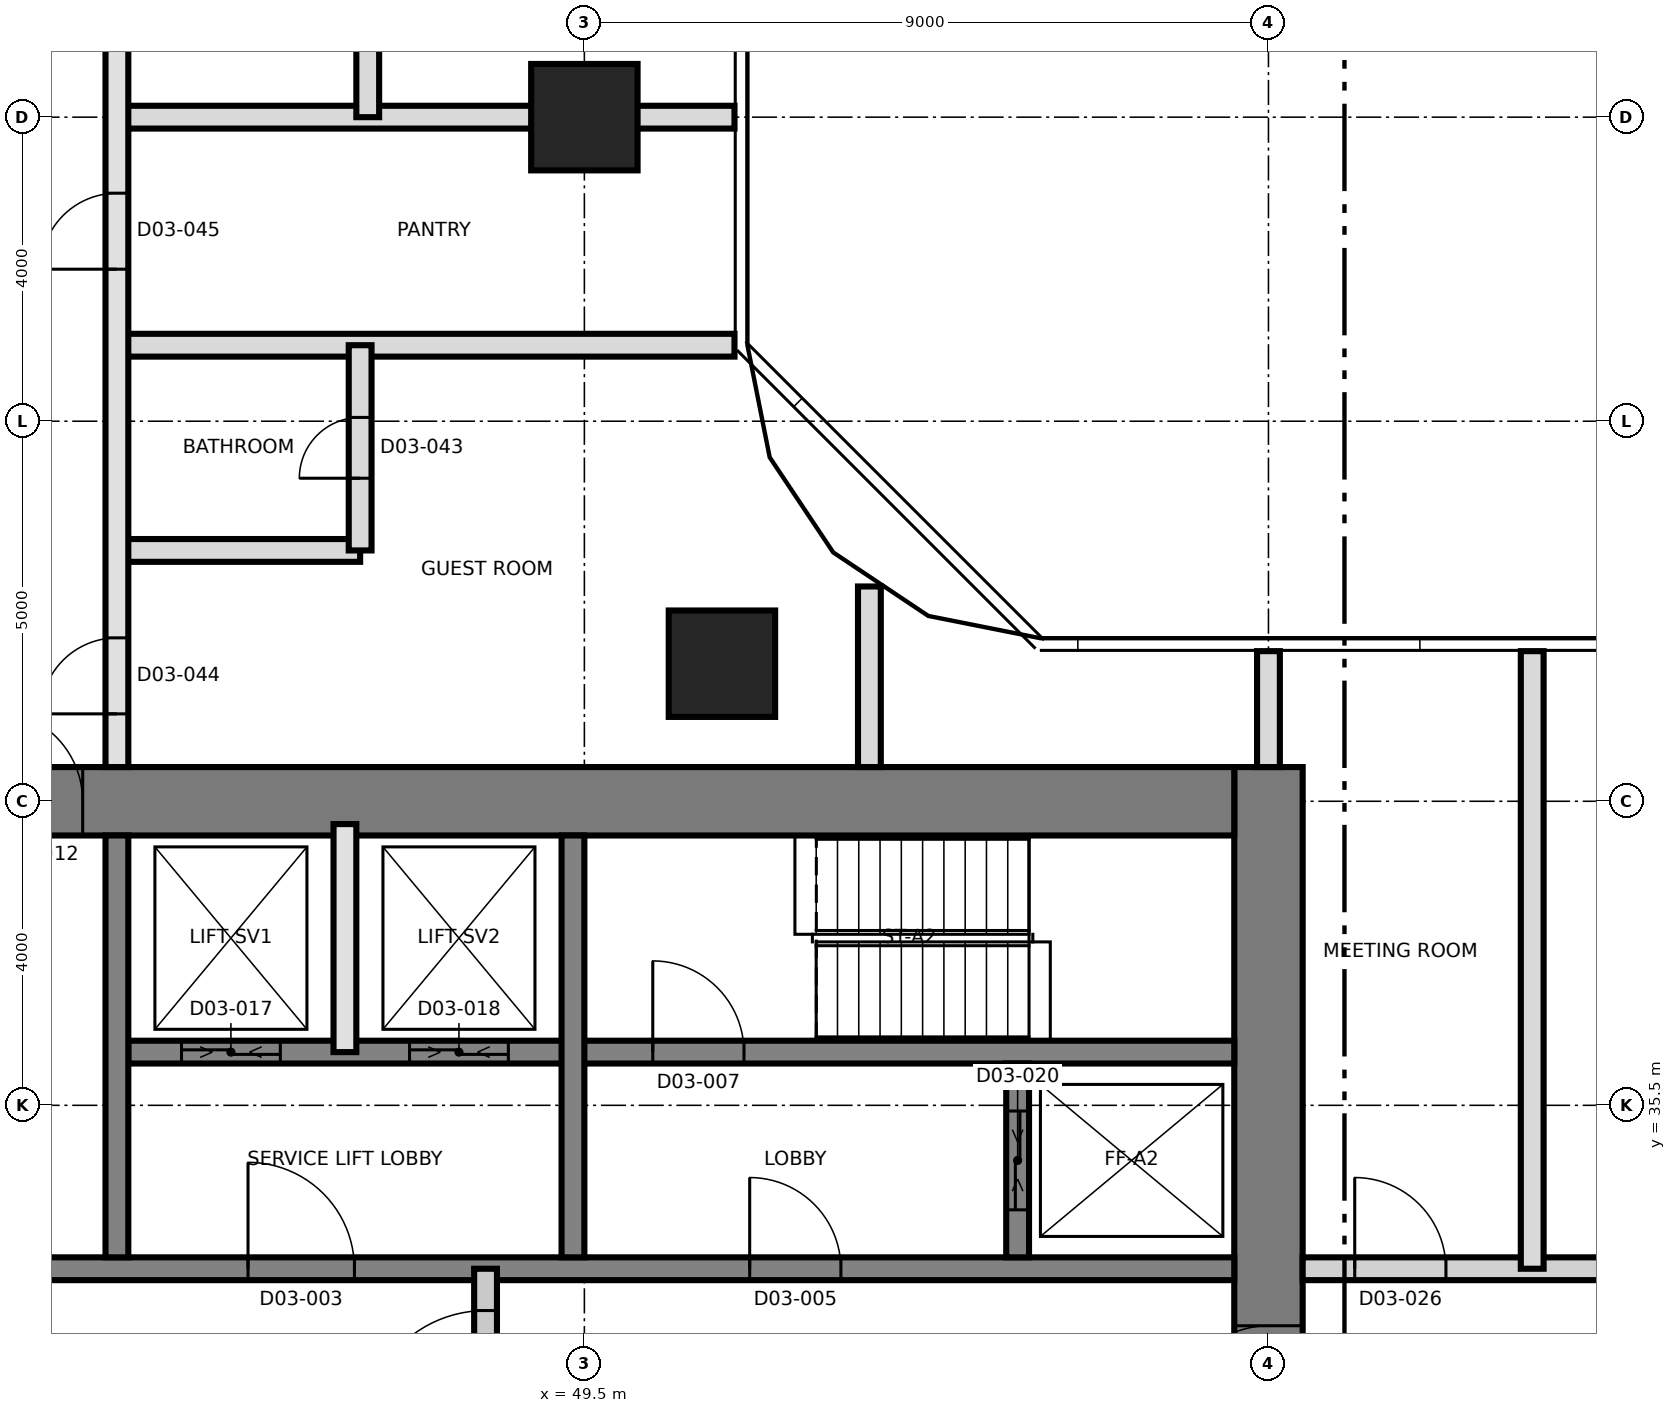
"""IFC4 building model, lengths in metres.
Left out: names, types, materials, properties, quantities, classifications, styles, units other than length and angle.
Written with IfcOpenShell. Run it as: python <this file> out.ifc"""

import sys

from ifc_helpers import new_model, si_unit, direction, frame, frame_2d, origin, origin_2d, place, context, subcontext, project, spatial, rectangle, extrude, element, fill, save


model = new_model("IFC4")
c1 = context("Model", 3, precision=1e-05, world=origin(), true_north=direction((0.0, 1.0)))
c2 = subcontext(c1, "Body", "Model", "MODEL_VIEW")
j1 = project(units=[si_unit("LENGTHUNIT", "METRE"), si_unit("PLANEANGLEUNIT", "RADIAN")], contexts=[c1])
p1 = place(None, origin())
s1 = spatial("IfcSite", under=j1, at=p1, CompositionType="ELEMENT")
p2 = place(p1, origin())
s2 = spatial("IfcBuilding", under=s1, at=p2, CompositionType="ELEMENT")
p3 = place(p2, frame((0.0, 0.0, 59.4)))
s3 = spatial("IfcBuildingStorey", under=s2, at=p3, CompositionType="ELEMENT", Elevation=59.4)
p4 = place(p3, frame((58.5, 21.05, 0.0), z_axis=(0.0, 0.0, 1.0), x_axis=(0.0, 1.0, 0.0)))
e1 = element("IfcWall", 1, at=p4, inside=s3, PredefinedType="SHEAR", context=c2, shape_type="SweptSolid", body=[
    extrude(rectangle(XDim=18.9, YDim=0.9, at=frame_2d((9.45, 0.0))), origin(), (0.0, 0.0, 1.0), 3.7),
])
p5 = place(p4, frame((10.35, 0.0, 0.0)))
e2 = element("IfcOpeningElement", 2, at=p5, cuts=e1, PredefinedType="OPENING", context=c2, shape_type="SweptSolid", body=[
    extrude(rectangle(XDim=1.2, YDim=2.1, at=frame_2d((0.6, 1.05))), frame((0.0, 0.46, 0.0), z_axis=(0.0, -1.0, 0.0), x_axis=(1.0, 0.0, 0.0)), (0.0, 0.0, 1.0), 0.92),
])
p6 = place(p3, frame((31.05, 39.5, 0.0), z_axis=(0.0, 0.0, 1.0), x_axis=(1.0, 0.0, 0.0)))
e3 = element("IfcWall", 3, at=p6, inside=s3, PredefinedType="SHEAR", context=c2, shape_type="SweptSolid", body=[
    extrude(rectangle(XDim=27.0, YDim=0.9, at=frame_2d((13.5, 0.0))), origin(), (0.0, 0.0, 1.0), 3.7),
])
p7 = place(p6, frame((10.65, 0.0, 0.0)))
e4 = element("IfcOpeningElement", 4, at=p7, cuts=e3, PredefinedType="OPENING", context=c2, shape_type="SweptSolid", body=[
    extrude(rectangle(XDim=1.2, YDim=2.1, at=frame_2d((0.6, 1.05))), frame((0.0, 0.46, 0.0), z_axis=(0.0, -1.0, 0.0), x_axis=(1.0, 0.0, 0.0)), (0.0, 0.0, 1.0), 0.92),
])
p8 = place(p3, frame((31.95, 33.35, 0.0), z_axis=(0.0, 0.0, 1.0), x_axis=(1.0, 0.0, 0.0)))
e5 = element("IfcWall", 5, at=p8, inside=s3, PredefinedType="SHEAR", context=c2, shape_type="SweptSolid", body=[
    extrude(rectangle(XDim=26.1, YDim=0.3, at=frame_2d((13.05, 0.0))), origin(), (0.0, 0.0, 1.0), 3.7),
])
p9 = place(p8, frame((13.125, 0.0, 0.0)))
e6 = element("IfcOpeningElement", 6, at=p9, cuts=e5, PredefinedType="OPENING", context=c2, shape_type="SweptSolid", body=[
    extrude(rectangle(XDim=1.4, YDim=2.1, at=frame_2d((0.7, 1.05))), frame((0.0, 0.16, 0.0), z_axis=(0.0, -1.0, 0.0), x_axis=(1.0, 0.0, 0.0)), (0.0, 0.0, 1.0), 0.32),
])
p10 = place(p8, frame((5.175, 0.0, 0.0)))
e7 = element("IfcOpeningElement", 7, at=p10, cuts=e5, PredefinedType="OPENING", context=c2, shape_type="SweptSolid", body=[
    extrude(rectangle(XDim=1.2, YDim=2.1, at=frame_2d((0.6, 1.05))), frame((0.0, 0.16, 0.0), z_axis=(0.0, -1.0, 0.0), x_axis=(1.0, 0.0, 0.0)), (0.0, 0.0, 1.0), 0.32),
])
p11 = place(p8, frame((19.725, 0.0, 0.0)))
e8 = element("IfcOpeningElement", 8, at=p11, cuts=e5, PredefinedType="OPENING", context=c2, shape_type="SweptSolid", body=[
    extrude(rectangle(XDim=1.2, YDim=2.1, at=frame_2d((0.6, 1.05))), frame((0.0, 0.16, 0.0), z_axis=(0.0, -1.0, 0.0), x_axis=(1.0, 0.0, 0.0)), (0.0, 0.0, 1.0), 0.32),
])
p12 = place(p3, frame((43.5, 36.2, 0.0), z_axis=(0.0, 0.0, 1.0), x_axis=(1.0, 0.0, 0.0)))
e9 = element("IfcWall", 9, at=p12, inside=s3, PredefinedType="SHEAR", context=c2, shape_type="SweptSolid", body=[
    extrude(rectangle(XDim=14.55, YDim=0.3, at=frame_2d((7.275, 0.0))), origin(), (0.0, 0.0, 1.0), 3.7),
])
p13 = place(p12, frame((6.9, 0.0, 0.0)))
e10 = element("IfcOpeningElement", 10, at=p13, cuts=e9, PredefinedType="OPENING", context=c2, shape_type="SweptSolid", body=[
    extrude(rectangle(XDim=1.2, YDim=2.1, at=frame_2d((0.6, 1.05))), frame((0.0, 0.16, 0.0), z_axis=(0.0, -1.0, 0.0), x_axis=(1.0, 0.0, 0.0)), (0.0, 0.0, 1.0), 0.32),
])
p14 = place(p12, frame((0.7, 0.0, 0.0)))
e11 = element("IfcOpeningElement", 11, at=p14, cuts=e9, PredefinedType="OPENING", context=c2, shape_type="SweptSolid", body=[
    extrude(rectangle(XDim=1.3, YDim=2.4, at=frame_2d((0.65, 1.2))), frame((0.0, 0.16, 0.0), z_axis=(0.0, -1.0, 0.0), x_axis=(1.0, 0.0, 0.0)), (0.0, 0.0, 1.0), 0.32),
])
p15 = place(p12, frame((3.7, 0.0, 0.0)))
e12 = element("IfcOpeningElement", 12, at=p15, cuts=e9, PredefinedType="OPENING", context=c2, shape_type="SweptSolid", body=[
    extrude(rectangle(XDim=1.3, YDim=2.4, at=frame_2d((0.65, 1.2))), frame((0.0, 0.16, 0.0), z_axis=(0.0, -1.0, 0.0), x_axis=(1.0, 0.0, 0.0)), (0.0, 0.0, 1.0), 0.32),
])
for number, where, z_axis, x_axis in (
    (13, (43.35, 33.5, 0.0), (0.0, 0.0, 1.0), (0.0, 1.0, 0.0)),
    (14, (49.35, 33.5, 0.0), (0.0, 0.0, 1.0), (0.0, 1.0, 0.0)),
):
    element("IfcWall", number, at=place(p3, frame(where, z_axis=z_axis, x_axis=x_axis)), inside=s3, PredefinedType="SHEAR", context=c2, shape_type="SweptSolid", body=[
        extrude(rectangle(XDim=5.55, YDim=0.3, at=frame_2d((2.775, 0.0))), origin(), (0.0, 0.0, 1.0), 3.7),
    ])
p16 = place(p3, frame((55.2, 33.5, 0.0), z_axis=(0.0, 0.0, 1.0), x_axis=(0.0, 1.0, 0.0)))
e15 = element("IfcWall", 15, at=p16, inside=s3, PredefinedType="SHEAR", context=c2, shape_type="SweptSolid", body=[
    extrude(rectangle(XDim=2.55, YDim=0.3, at=frame_2d((1.275, 0.0))), origin(), (0.0, 0.0, 1.0), 3.7),
])
p17 = place(p16, frame((0.625, 0.0, 0.0)))
e16 = element("IfcOpeningElement", 16, at=p17, cuts=e15, PredefinedType="OPENING", context=c2, shape_type="SweptSolid", body=[
    extrude(rectangle(XDim=1.3, YDim=2.4, at=frame_2d((0.65, 1.2))), frame((0.0, 0.16, 0.0), z_axis=(0.0, -1.0, 0.0), x_axis=(1.0, 0.0, 0.0)), (0.0, 0.0, 1.0), 0.32),
])
for number, where, z_axis, x_axis in (
    (17, (51.31, 41.31, 0.0), (0.0, 0.0, 1.0), (1.0, 0.0, 0.0)),
    (18, (49.5, 48.5, 0.0), (0.0, 0.0, 1.0), (1.0, 0.0, 0.0)),
):
    element("IfcColumn", number, at=place(p3, frame(where, z_axis=z_axis, x_axis=x_axis)), inside=s3, PredefinedType="COLUMN", context=c2, shape_type="SweptSolid", body=[
        extrude(rectangle(XDim=1.4, YDim=1.4, at=origin_2d()), origin(), (0.0, 0.0, 1.0), 3.7),
    ])
p18 = place(p3, frame((46.35, 36.2, 0.0), z_axis=(0.0, 0.0, 1.0), x_axis=(0.0, 1.0, 0.0)))
e19 = element("IfcWall", 19, at=p18, inside=s3, PredefinedType="SOLIDWALL", context=c2, shape_type="SweptSolid", body=[
    extrude(rectangle(XDim=3.0, YDim=0.3, at=frame_2d((1.5, 0.0))), origin(), (0.0, 0.0, 1.0), 3.4),
])
p19 = place(p3, frame((48.2, 24.9, 0.0), z_axis=(0.0, 0.0, 1.0), x_axis=(0.0, 1.0, 0.0)))
e20 = element("IfcWall", 20, at=p19, inside=s3, PredefinedType="PARTITIONING", context=c2, shape_type="SweptSolid", body=[
    extrude(rectangle(XDim=8.45, YDim=0.3, at=frame_2d((4.225, 0.0))), origin(), (0.0, 0.0, 1.0), 3.4),
])
p20 = place(p19, frame((6.3, 0.0, 0.0)))
e21 = element("IfcOpeningElement", 21, at=p20, cuts=e20, PredefinedType="OPENING", context=c2, shape_type="SweptSolid", body=[
    extrude(rectangle(XDim=1.6, YDim=2.1, at=frame_2d((0.8, 1.05))), frame((0.0, 0.16, 0.0), z_axis=(0.0, -1.0, 0.0), x_axis=(1.0, 0.0, 0.0)), (0.0, 0.0, 1.0), 0.32),
])
p21 = place(p3, frame((58.95, 33.35, 0.0), z_axis=(0.0, 0.0, 1.0), x_axis=(1.0, 0.0, 0.0)))
e22 = element("IfcWall", 22, at=p21, inside=s3, PredefinedType="PARTITIONING", context=c2, shape_type="SweptSolid", body=[
    extrude(rectangle(XDim=26.38, YDim=0.3, at=frame_2d((13.19, 0.0))), origin(), (0.0, 0.0, 1.0), 3.4),
])
p22 = place(p21, frame((0.685, 0.0, 0.0)))
e23 = element("IfcOpeningElement", 23, at=p22, cuts=e22, PredefinedType="OPENING", context=c2, shape_type="SweptSolid", body=[
    extrude(rectangle(XDim=1.2, YDim=2.1, at=frame_2d((0.6, 1.05))), frame((0.0, 0.16, 0.0), z_axis=(0.0, -1.0, 0.0), x_axis=(1.0, 0.0, 0.0)), (0.0, 0.0, 1.0), 0.32),
])
p23 = place(p21, frame((3.935, 0.0, 0.0)))
e24 = element("IfcOpeningElement", 24, at=p23, cuts=e22, PredefinedType="OPENING", context=c2, shape_type="SweptSolid", body=[
    extrude(rectangle(XDim=1.0, YDim=2.1, at=frame_2d((0.5, 1.05))), frame((0.0, 0.16, 0.0), z_axis=(0.0, -1.0, 0.0), x_axis=(1.0, 0.0, 0.0)), (0.0, 0.0, 1.0), 0.32),
])
p24 = place(p21, frame((14.2, 0.0, 0.0)))
e25 = element("IfcOpeningElement", 25, at=p24, cuts=e22, PredefinedType="OPENING", context=c2, shape_type="SweptSolid", body=[
    extrude(rectangle(XDim=1.0, YDim=2.4, at=frame_2d((0.5, 1.2))), frame((0.0, 0.16, 0.0), z_axis=(0.0, -1.0, 0.0), x_axis=(1.0, 0.0, 0.0)), (0.0, 0.0, 1.0), 0.32),
])
p25 = place(p21, frame((19.25, 0.0, 0.0)))
e26 = element("IfcOpeningElement", 26, at=p25, cuts=e22, PredefinedType="OPENING", context=c2, shape_type="SweptSolid", body=[
    extrude(rectangle(XDim=1.2, YDim=2.1, at=frame_2d((0.6, 1.05))), frame((0.0, 0.16, 0.0), z_axis=(0.0, -1.0, 0.0), x_axis=(1.0, 0.0, 0.0)), (0.0, 0.0, 1.0), 0.32),
])
p26 = place(p21, frame((22.5, 0.0, 0.0)))
e27 = element("IfcOpeningElement", 27, at=p26, cuts=e22, PredefinedType="OPENING", context=c2, shape_type="SweptSolid", body=[
    extrude(rectangle(XDim=1.0, YDim=2.1, at=frame_2d((0.5, 1.05))), frame((0.0, 0.16, 0.0), z_axis=(0.0, -1.0, 0.0), x_axis=(1.0, 0.0, 0.0)), (0.0, 0.0, 1.0), 0.32),
])
p27 = place(p3, frame((43.35, 42.8, 0.0), z_axis=(0.0, 0.0, 1.0), x_axis=(1.0, 0.0, 0.0)))
e28 = element("IfcWall", 28, at=p27, inside=s3, PredefinedType="PARTITIONING", context=c2, shape_type="SweptSolid", body=[
    extrude(rectangle(XDim=3.2, YDim=0.3, at=frame_2d((1.6, 0.0))), origin(), (0.0, 0.0, 1.0), 3.4),
])
for number, where, z_axis, x_axis in (
    (29, (43.35, 45.5, 0.0), (0.0, 0.0, 1.0), (1.0, 0.0, 0.0)),
    (30, (43.35, 48.5, 0.0), (0.0, 0.0, 1.0), (1.0, 0.0, 0.0)),
):
    element("IfcWall", number, at=place(p3, frame(where, z_axis=z_axis, x_axis=x_axis)), inside=s3, PredefinedType="PARTITIONING", context=c2, shape_type="SweptSolid", body=[
        extrude(rectangle(XDim=8.125, YDim=0.3, at=frame_2d((4.062, 0.0))), origin(), (0.0, 0.0, 1.0), 3.4),
    ])
p28 = place(p3, frame((43.35, 39.95, 0.0), z_axis=(0.0, 0.0, 1.0), x_axis=(0.0, 1.0, 0.0)))
e31 = element("IfcWall", 31, at=p28, inside=s3, PredefinedType="SOLIDWALL", context=c2, shape_type="SweptSolid", body=[
    extrude(rectangle(XDim=25.85, YDim=0.3, at=frame_2d((12.925, 0.0))), origin(), (0.0, 0.0, 1.0), 3.4),
])
p29 = place(p28, frame((0.7, 0.0, 0.0)))
e32 = element("IfcOpeningElement", 32, at=p29, cuts=e31, PredefinedType="OPENING", context=c2, shape_type="SweptSolid", body=[
    extrude(rectangle(XDim=1.0, YDim=2.1, at=frame_2d((0.5, 1.05))), frame((0.0, 0.16, 0.0), z_axis=(0.0, -1.0, 0.0), x_axis=(1.0, 0.0, 0.0)), (0.0, 0.0, 1.0), 0.32),
])
p30 = place(p28, frame((6.55, 0.0, 0.0)))
e33 = element("IfcOpeningElement", 33, at=p30, cuts=e31, PredefinedType="OPENING", context=c2, shape_type="SweptSolid", body=[
    extrude(rectangle(XDim=1.0, YDim=2.1, at=frame_2d((0.5, 1.05))), frame((0.0, 0.16, 0.0), z_axis=(0.0, -1.0, 0.0), x_axis=(1.0, 0.0, 0.0)), (0.0, 0.0, 1.0), 0.32),
])
p31 = place(p28, frame((12.55, 0.0, 0.0)))
e34 = element("IfcOpeningElement", 34, at=p31, cuts=e31, PredefinedType="OPENING", context=c2, shape_type="SweptSolid", body=[
    extrude(rectangle(XDim=1.0, YDim=2.4, at=frame_2d((0.5, 1.2))), frame((0.0, 0.16, 0.0), z_axis=(0.0, -1.0, 0.0), x_axis=(1.0, 0.0, 0.0)), (0.0, 0.0, 1.0), 0.32),
])
p32 = place(p28, frame((21.1, 0.0, 0.0)))
e35 = element("IfcOpeningElement", 35, at=p32, cuts=e31, PredefinedType="OPENING", context=c2, shape_type="SweptSolid", body=[
    extrude(rectangle(XDim=1.0, YDim=2.4, at=frame_2d((0.5, 1.2))), frame((0.0, 0.16, 0.0), z_axis=(0.0, -1.0, 0.0), x_axis=(1.0, 0.0, 0.0)), (0.0, 0.0, 1.0), 0.32),
])
p33 = place(p3, frame((46.55, 42.8, 0.0), z_axis=(0.0, 0.0, 1.0), x_axis=(0.0, 1.0, 0.0)))
e36 = element("IfcWall", 36, at=p33, inside=s3, PredefinedType="PARTITIONING", context=c2, shape_type="SweptSolid", body=[
    extrude(rectangle(XDim=2.7, YDim=0.3, at=frame_2d((1.35, 0.0))), origin(), (0.0, 0.0, 1.0), 3.4),
])
p34 = place(p33, frame((0.95, 0.0, 0.0)))
e37 = element("IfcOpeningElement", 37, at=p34, cuts=e36, PredefinedType="OPENING", context=c2, shape_type="SweptSolid", body=[
    extrude(rectangle(XDim=0.8, YDim=2.1, at=frame_2d((0.4, 1.05))), frame((0.0, 0.16, 0.0), z_axis=(0.0, -1.0, 0.0), x_axis=(1.0, 0.0, 0.0)), (0.0, 0.0, 1.0), 0.32),
])
p35 = place(p3, frame((46.65, 48.5, 0.0), z_axis=(0.0, 0.0, 1.0), x_axis=(0.0, 1.0, 0.0)))
e38 = element("IfcWall", 38, at=p35, inside=s3, PredefinedType="PARTITIONING", context=c2, shape_type="SweptSolid", body=[
    extrude(rectangle(XDim=3.0, YDim=0.3, at=frame_2d((1.5, 0.0))), origin(), (0.0, 0.0, 1.0), 3.4),
])
p36 = place(p35, frame((1.1, 0.0, 0.0)))
e39 = element("IfcOpeningElement", 39, at=p36, cuts=e38, PredefinedType="OPENING", context=c2, shape_type="SweptSolid", body=[
    extrude(rectangle(XDim=0.8, YDim=2.1, at=frame_2d((0.4, 1.05))), frame((0.0, 0.16, 0.0), z_axis=(0.0, -1.0, 0.0), x_axis=(1.0, 0.0, 0.0)), (0.0, 0.0, 1.0), 0.32),
])
p37 = place(p3, frame((53.25, 39.95, 0.0), z_axis=(0.0, 0.0, 1.0), x_axis=(0.0, 1.0, 0.0)))
e40 = element("IfcWall", 40, at=p37, inside=s3, PredefinedType="PARTITIONING", context=c2, shape_type="SweptSolid", body=[
    extrude(rectangle(XDim=2.376, YDim=0.3, at=frame_2d((1.188, 0.0))), origin(), (0.0, 0.0, 1.0), 3.4),
])
p38 = place(p3, frame((58.5, 39.95, 0.0), z_axis=(0.0, 0.0, 1.0), x_axis=(0.0, 1.0, 0.0)))
e41 = element("IfcWall", 41, at=p38, inside=s3, PredefinedType="PARTITIONING", context=c2, shape_type="SweptSolid", body=[
    extrude(rectangle(XDim=1.525, YDim=0.3, at=frame_2d((0.763, 0.0))), origin(), (0.0, 0.0, 1.0), 3.4),
])
p39 = place(p3, frame((61.97, 33.35, 0.0), z_axis=(0.0, 0.0, 1.0), x_axis=(0.0, 1.0, 0.0)))
e42 = element("IfcWall", 42, at=p39, inside=s3, PredefinedType="PARTITIONING", context=c2, shape_type="SweptSolid", body=[
    extrude(rectangle(XDim=8.125, YDim=0.3, at=frame_2d((4.062, 0.0))), origin(), (0.0, 0.0, 1.0), 3.4),
])
p40 = place(p20, origin())
e43 = element("IfcDoor", 43, at=p40, inside=s3, OperationType="SINGLE_SWING_LEFT", PredefinedType="DOOR", context=c2, shape_type="SweptSolid", body=[
    extrude(rectangle(XDim=1.6, YDim=2.1, at=frame_2d((0.8, 1.05))), frame((0.0, 0.025, 0.0), z_axis=(0.0, -1.0, 0.0), x_axis=(1.0, 0.0, 0.0)), (0.0, 0.0, 1.0), 0.05),
])
fill(e21, e43)
p41 = place(p9, origin())
e44 = element("IfcDoor", 44, at=p41, inside=s3, OperationType="SINGLE_SWING_RIGHT", PredefinedType="DOOR", context=c2, shape_type="SweptSolid", body=[
    extrude(rectangle(XDim=1.4, YDim=2.1, at=frame_2d((0.7, 1.05))), frame((0.0, 0.025, 0.0), z_axis=(0.0, -1.0, 0.0), x_axis=(1.0, 0.0, 0.0)), (0.0, 0.0, 1.0), 0.05),
])
fill(e6, e44)
p42 = place(p11, origin())
e45 = element("IfcDoor", 45, at=p42, inside=s3, OperationType="SINGLE_SWING_RIGHT", PredefinedType="DOOR", context=c2, shape_type="SweptSolid", body=[
    extrude(rectangle(XDim=1.2, YDim=2.1, at=frame_2d((0.6, 1.05))), frame((0.0, 0.025, 0.0), z_axis=(0.0, -1.0, 0.0), x_axis=(1.0, 0.0, 0.0)), (0.0, 0.0, 1.0), 0.05),
])
fill(e8, e45)
p43 = place(p13, origin())
e46 = element("IfcDoor", 46, at=p43, inside=s3, OperationType="SINGLE_SWING_LEFT", PredefinedType="DOOR", context=c2, shape_type="SweptSolid", body=[
    extrude(rectangle(XDim=1.2, YDim=2.1, at=frame_2d((0.6, 1.05))), frame((0.0, 0.025, 0.0), z_axis=(0.0, -1.0, 0.0), x_axis=(1.0, 0.0, 0.0)), (0.0, 0.0, 1.0), 0.05),
])
fill(e10, e46)
p44 = place(p5, origin())
e47 = element("IfcDoor", 47, at=p44, inside=s3, OperationType="SINGLE_SWING_LEFT", PredefinedType="DOOR", context=c2, shape_type="SweptSolid", body=[
    extrude(rectangle(XDim=1.2, YDim=2.1, at=frame_2d((0.6, 1.05))), frame((0.0, 0.025, 0.0), z_axis=(0.0, -1.0, 0.0), x_axis=(1.0, 0.0, 0.0)), (0.0, 0.0, 1.0), 0.05),
])
fill(e2, e47)
p45 = place(p7, origin())
e48 = element("IfcDoor", 48, at=p45, inside=s3, OperationType="SINGLE_SWING_RIGHT", PredefinedType="DOOR", context=c2, shape_type="SweptSolid", body=[
    extrude(rectangle(XDim=1.2, YDim=2.1, at=frame_2d((0.6, 1.05))), frame((0.0, 0.025, 0.0), z_axis=(0.0, -1.0, 0.0), x_axis=(1.0, 0.0, 0.0)), (0.0, 0.0, 1.0), 0.05),
])
fill(e4, e48)
p46 = place(p14, origin())
e49 = element("IfcDoor", 49, at=p46, inside=s3, OperationType="SLIDING_TO_LEFT", PredefinedType="DOOR", context=c2, shape_type="SweptSolid", body=[
    extrude(rectangle(XDim=1.3, YDim=2.4, at=frame_2d((0.65, 1.2))), frame((0.0, 0.025, 0.0), z_axis=(0.0, -1.0, 0.0), x_axis=(1.0, 0.0, 0.0)), (0.0, 0.0, 1.0), 0.05),
])
fill(e11, e49)
p47 = place(p15, origin())
e50 = element("IfcDoor", 50, at=p47, inside=s3, OperationType="SLIDING_TO_LEFT", PredefinedType="DOOR", context=c2, shape_type="SweptSolid", body=[
    extrude(rectangle(XDim=1.3, YDim=2.4, at=frame_2d((0.65, 1.2))), frame((0.0, 0.025, 0.0), z_axis=(0.0, -1.0, 0.0), x_axis=(1.0, 0.0, 0.0)), (0.0, 0.0, 1.0), 0.05),
])
fill(e12, e50)
p48 = place(p17, origin())
e51 = element("IfcDoor", 51, at=p48, inside=s3, OperationType="SLIDING_TO_LEFT", PredefinedType="DOOR", context=c2, shape_type="SweptSolid", body=[
    extrude(rectangle(XDim=1.3, YDim=2.4, at=frame_2d((0.65, 1.2))), frame((0.0, 0.025, 0.0), z_axis=(0.0, -1.0, 0.0), x_axis=(1.0, 0.0, 0.0)), (0.0, 0.0, 1.0), 0.05),
])
fill(e16, e51)
p49 = place(p22, origin())
e52 = element("IfcDoor", 52, at=p49, inside=s3, OperationType="SINGLE_SWING_LEFT", PredefinedType="DOOR", context=c2, shape_type="SweptSolid", body=[
    extrude(rectangle(XDim=1.2, YDim=2.1, at=frame_2d((0.6, 1.05))), frame((0.0, 0.025, 0.0), z_axis=(0.0, -1.0, 0.0), x_axis=(1.0, 0.0, 0.0)), (0.0, 0.0, 1.0), 0.05),
])
fill(e23, e52)
p50 = place(p34, origin())
e53 = element("IfcDoor", 53, at=p50, inside=s3, OperationType="SINGLE_SWING_LEFT", PredefinedType="DOOR", context=c2, shape_type="SweptSolid", body=[
    extrude(rectangle(XDim=0.8, YDim=2.1, at=frame_2d((0.4, 1.05))), frame((0.0, 0.025, 0.0), z_axis=(0.0, -1.0, 0.0), x_axis=(1.0, 0.0, 0.0)), (0.0, 0.0, 1.0), 0.05),
])
fill(e37, e53)
p51 = place(p29, origin())
e54 = element("IfcDoor", 54, at=p51, inside=s3, OperationType="SINGLE_SWING_RIGHT", PredefinedType="DOOR", context=c2, shape_type="SweptSolid", body=[
    extrude(rectangle(XDim=1.0, YDim=2.1, at=frame_2d((0.5, 1.05))), frame((0.0, 0.025, 0.0), z_axis=(0.0, -1.0, 0.0), x_axis=(1.0, 0.0, 0.0)), (0.0, 0.0, 1.0), 0.05),
])
fill(e32, e54)
p52 = place(p30, origin())
e55 = element("IfcDoor", 55, at=p52, inside=s3, OperationType="SINGLE_SWING_LEFT", PredefinedType="DOOR", context=c2, shape_type="SweptSolid", body=[
    extrude(rectangle(XDim=1.0, YDim=2.1, at=frame_2d((0.5, 1.05))), frame((0.0, 0.025, 0.0), z_axis=(0.0, -1.0, 0.0), x_axis=(1.0, 0.0, 0.0)), (0.0, 0.0, 1.0), 0.05),
])
fill(e33, e55)
save(model, sys.argv[1])
